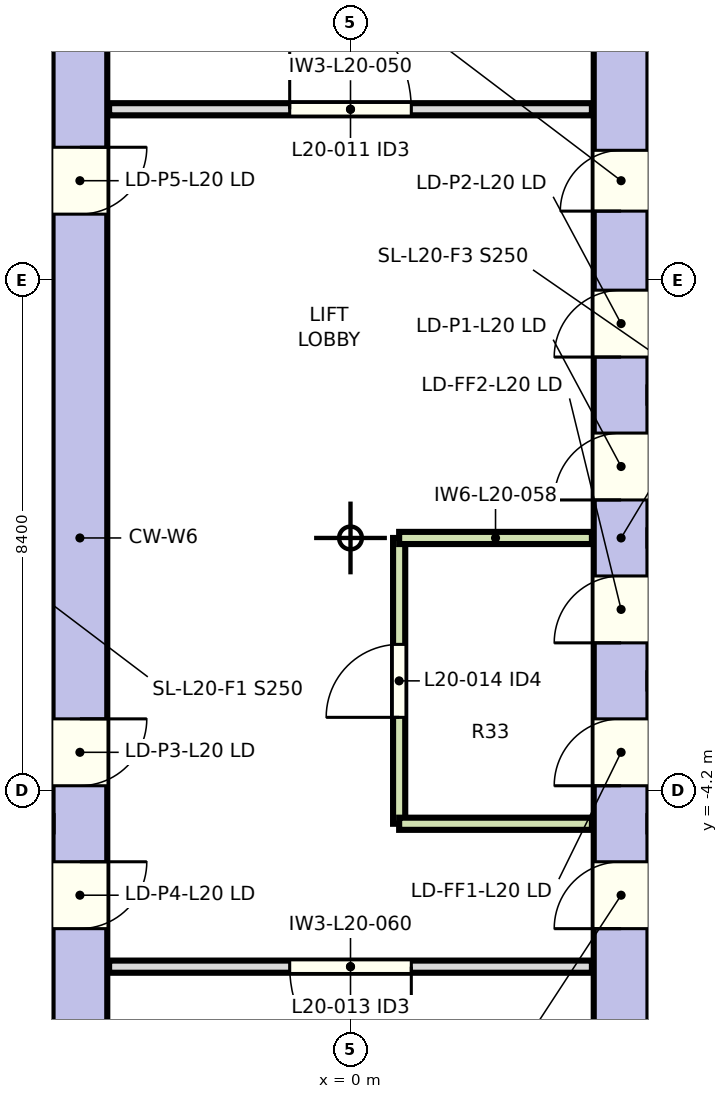
"""IFC4 building model, lengths in metres.
Left out: names, types, materials, properties, quantities, classifications, styles, units other than length and angle.
Written with IfcOpenShell. Run it as: python <this file> out.ifc"""

import sys

from ifc_helpers import new_model, si_unit, direction, frame, frame_2d, origin, place, context, subcontext, project, spatial, rectangle, extrude, element, fill, save


model = new_model("IFC4")
c1 = context("Model", 3, precision=1e-05, world=origin(), true_north=direction((0.0, 1.0)))
c2 = subcontext(c1, "Body", "Model", "MODEL_VIEW")
j1 = project(units=[si_unit("LENGTHUNIT", "METRE"), si_unit("PLANEANGLEUNIT", "RADIAN")], contexts=[c1])
p1 = place(None, origin())
s1 = spatial("IfcSite", under=j1, at=p1, CompositionType="ELEMENT")
p2 = place(p1, origin())
s2 = spatial("IfcBuilding", under=s1, at=p2, CompositionType="ELEMENT")
p3 = place(p2, frame((0.0, 0.0, 104.1)))
s3 = spatial("IfcBuildingStorey", under=s2, at=p3, CompositionType="ELEMENT", Elevation=104.1)
p4 = place(p3, frame((-4.45, 11.633, 0.0), z_axis=(0.0, 0.0, 1.0), x_axis=(0.0, -1.0, 0.0)))
e1 = element("IfcWall", 1, at=p4, inside=s3, PredefinedType="SHEAR", context=c2, shape_type="SweptSolid", body=[
    extrude(rectangle(XDim=23.265, YDim=0.9, at=frame_2d((11.633, 0.0))), origin(), (0.0, 0.0, 1.0), 3.8),
])
p5 = place(p4, frame((14.607, 0.0, 0.0)))
e2 = element("IfcOpeningElement", 2, at=p5, cuts=e1, PredefinedType="OPENING", context=c2, shape_type="SweptSolid", body=[
    extrude(rectangle(XDim=1.1, YDim=2.1, at=frame_2d((0.55, 1.05))), frame((0.0, 0.46, 0.0), z_axis=(0.0, -1.0, 0.0), x_axis=(1.0, 0.0, 0.0)), (0.0, 0.0, 1.0), 0.92),
])
p6 = place(p4, frame((16.958, 0.0, 0.0)))
e3 = element("IfcOpeningElement", 3, at=p6, cuts=e1, PredefinedType="OPENING", context=c2, shape_type="SweptSolid", body=[
    extrude(rectangle(XDim=1.1, YDim=2.1, at=frame_2d((0.55, 1.05))), frame((0.0, 0.46, 0.0), z_axis=(0.0, -1.0, 0.0), x_axis=(1.0, 0.0, 0.0)), (0.0, 0.0, 1.0), 0.92),
])
p7 = place(p4, frame((5.208, 0.0, 0.0)))
e4 = element("IfcOpeningElement", 4, at=p7, cuts=e1, PredefinedType="OPENING", context=c2, shape_type="SweptSolid", body=[
    extrude(rectangle(XDim=1.1, YDim=2.1, at=frame_2d((0.55, 1.05))), frame((0.0, 0.46, 0.0), z_axis=(0.0, -1.0, 0.0), x_axis=(1.0, 0.0, 0.0)), (0.0, 0.0, 1.0), 0.92),
])
p8 = place(p3, frame((4.45, -11.633, 0.0), z_axis=(0.0, 0.0, 1.0), x_axis=(0.0, 1.0, 0.0)))
e5 = element("IfcWall", 5, at=p8, inside=s3, PredefinedType="SHEAR", context=c2, shape_type="SweptSolid", body=[
    extrude(rectangle(XDim=23.265, YDim=0.9, at=frame_2d((11.633, 0.0))), origin(), (0.0, 0.0, 1.0), 3.8),
])
p9 = place(p8, frame((7.558, 0.0, 0.0)))
e6 = element("IfcOpeningElement", 6, at=p9, cuts=e5, PredefinedType="OPENING", context=c2, shape_type="SweptSolid", body=[
    extrude(rectangle(XDim=1.1, YDim=2.1, at=frame_2d((0.55, 1.05))), frame((0.0, 0.46, 0.0), z_axis=(0.0, -1.0, 0.0), x_axis=(1.0, 0.0, 0.0)), (0.0, 0.0, 1.0), 0.92),
])
p10 = place(p8, frame((9.907, 0.0, 0.0)))
e7 = element("IfcOpeningElement", 7, at=p10, cuts=e5, PredefinedType="OPENING", context=c2, shape_type="SweptSolid", body=[
    extrude(rectangle(XDim=1.1, YDim=2.1, at=frame_2d((0.55, 1.05))), frame((0.0, 0.46, 0.0), z_axis=(0.0, -1.0, 0.0), x_axis=(1.0, 0.0, 0.0)), (0.0, 0.0, 1.0), 0.92),
])
p11 = place(p8, frame((12.258, 0.0, 0.0)))
e8 = element("IfcOpeningElement", 8, at=p11, cuts=e5, PredefinedType="OPENING", context=c2, shape_type="SweptSolid", body=[
    extrude(rectangle(XDim=1.1, YDim=2.1, at=frame_2d((0.55, 1.05))), frame((0.0, 0.46, 0.0), z_axis=(0.0, -1.0, 0.0), x_axis=(1.0, 0.0, 0.0)), (0.0, 0.0, 1.0), 0.92),
])
p12 = place(p8, frame((14.607, 0.0, 0.0)))
e9 = element("IfcOpeningElement", 9, at=p12, cuts=e5, PredefinedType="OPENING", context=c2, shape_type="SweptSolid", body=[
    extrude(rectangle(XDim=1.1, YDim=2.1, at=frame_2d((0.55, 1.05))), frame((0.0, 0.46, 0.0), z_axis=(0.0, -1.0, 0.0), x_axis=(1.0, 0.0, 0.0)), (0.0, 0.0, 1.0), 0.92),
])
p13 = place(p8, frame((5.208, 0.0, 0.0)))
e10 = element("IfcOpeningElement", 10, at=p13, cuts=e5, PredefinedType="OPENING", context=c2, shape_type="SweptSolid", body=[
    extrude(rectangle(XDim=1.1, YDim=2.1, at=frame_2d((0.55, 1.05))), frame((0.0, 0.46, 0.0), z_axis=(0.0, -1.0, 0.0), x_axis=(1.0, 0.0, 0.0)), (0.0, 0.0, 1.0), 0.92),
])
p14 = place(p8, frame((17.008, 0.0, 0.0)))
e11 = element("IfcOpeningElement", 11, at=p14, cuts=e5, PredefinedType="OPENING", context=c2, shape_type="SweptSolid", body=[
    extrude(rectangle(XDim=1.0, YDim=2.1, at=frame_2d((0.5, 1.05))), frame((0.0, 0.46, 0.0), z_axis=(0.0, -1.0, 0.0), x_axis=(1.0, 0.0, 0.0)), (0.0, 0.0, 1.0), 0.92),
])
p15 = place(p3, frame((-3.97, 7.05, 0.0), z_axis=(0.0, 0.0, 1.0), x_axis=(1.0, 0.0, 0.0)))
e12 = element("IfcWall", 12, at=p15, inside=s3, PredefinedType="PARTITIONING", context=c2, shape_type="SweptSolid", body=[
    extrude(rectangle(XDim=7.94, YDim=0.2, at=frame_2d((3.97, 0.0))), origin(), (0.0, 0.0, 1.0), 3.55),
])
p16 = place(p15, frame((2.97, 0.0, 0.0)))
e13 = element("IfcOpeningElement", 13, at=p16, cuts=e12, PredefinedType="OPENING", context=c2, shape_type="SweptSolid", body=[
    extrude(rectangle(XDim=2.0, YDim=2.1, at=frame_2d((1.0, 1.05))), frame((0.0, 0.11, 0.0), z_axis=(0.0, -1.0, 0.0), x_axis=(1.0, 0.0, 0.0)), (0.0, 0.0, 1.0), 0.22),
])
p17 = place(p3, frame((0.8, -4.7, 0.0), z_axis=(0.0, 0.0, 1.0), x_axis=(0.0, 1.0, 0.0)))
e14 = element("IfcWall", 14, at=p17, inside=s3, PredefinedType="SOLIDWALL", context=c2, shape_type="SweptSolid", body=[
    extrude(rectangle(XDim=4.7, YDim=0.2, at=frame_2d((2.35, 0.0))), origin(), (0.0, 0.0, 1.0), 3.55),
])
p18 = place(p17, frame((1.75, 0.0, 0.0)))
e15 = element("IfcOpeningElement", 15, at=p18, cuts=e14, PredefinedType="OPENING", context=c2, shape_type="SweptSolid", body=[
    extrude(rectangle(XDim=1.2, YDim=2.1, at=frame_2d((0.6, 1.05))), frame((0.0, 0.11, 0.0), z_axis=(0.0, -1.0, 0.0), x_axis=(1.0, 0.0, 0.0)), (0.0, 0.0, 1.0), 0.22),
])
p19 = place(p3, frame((0.8, 0.0, 0.0), z_axis=(0.0, 0.0, 1.0), x_axis=(1.0, 0.0, 0.0)))
e16 = element("IfcWall", 16, at=p19, inside=s3, PredefinedType="SOLIDWALL", context=c2, shape_type="SweptSolid", body=[
    extrude(rectangle(XDim=3.17, YDim=0.2, at=frame_2d((1.585, 0.0))), origin(), (0.0, 0.0, 1.0), 3.55),
])
p20 = place(p3, frame((3.97, -7.05, 0.0), z_axis=(0.0, 0.0, 1.0), x_axis=(-1.0, 0.0, 0.0)))
e17 = element("IfcWall", 17, at=p20, inside=s3, PredefinedType="PARTITIONING", context=c2, shape_type="SweptSolid", body=[
    extrude(rectangle(XDim=7.94, YDim=0.2, at=frame_2d((3.97, 0.0))), origin(), (0.0, 0.0, 1.0), 3.55),
])
p21 = place(p20, frame((2.97, 0.0, 0.0)))
e18 = element("IfcOpeningElement", 18, at=p21, cuts=e17, PredefinedType="OPENING", context=c2, shape_type="SweptSolid", body=[
    extrude(rectangle(XDim=2.0, YDim=2.1, at=frame_2d((1.0, 1.05))), frame((0.0, 0.11, 0.0), z_axis=(0.0, -1.0, 0.0), x_axis=(1.0, 0.0, 0.0)), (0.0, 0.0, 1.0), 0.22),
])
p22 = place(p3, frame((3.97, -4.7, 0.0), z_axis=(0.0, 0.0, 1.0), x_axis=(-1.0, 0.0, 0.0)))
e19 = element("IfcWall", 19, at=p22, inside=s3, PredefinedType="SOLIDWALL", context=c2, shape_type="SweptSolid", body=[
    extrude(rectangle(XDim=3.17, YDim=0.2, at=frame_2d((1.585, 0.0))), origin(), (0.0, 0.0, 1.0), 3.55),
])
p23 = place(p3, frame((4.599, 15.862, 0.0), z_axis=(0.0, 0.0, 1.0), x_axis=(-0.94551912499, -0.325566558907, 0.0)))
e20 = element("IfcWall", 20, at=p23, inside=s3, PredefinedType="PARTITIONING", context=c2, shape_type="SweptSolid", body=[
    extrude(rectangle(XDim=26.293, YDim=0.2, at=frame_2d((13.146, 0.0))), origin(), (0.0, 0.0, 1.0), 3.55),
])
p24 = place(p23, frame((10.81, 0.0, 0.0)))
e21 = element("IfcOpeningElement", 21, at=p24, cuts=e20, PredefinedType="OPENING", context=c2, shape_type="SweptSolid", body=[
    extrude(rectangle(XDim=0.9, YDim=2.1, at=frame_2d((0.45, 1.05))), frame((0.0, 0.11, 0.0), z_axis=(0.0, -1.0, 0.0), x_axis=(1.0, 0.0, 0.0)), (0.0, 0.0, 1.0), 0.22),
])
p25 = place(p23, frame((5.979, 0.0, 0.0)))
e22 = element("IfcOpeningElement", 22, at=p25, cuts=e20, PredefinedType="OPENING", context=c2, shape_type="SweptSolid", body=[
    extrude(rectangle(XDim=2.0, YDim=2.1, at=frame_2d((1.0, 1.05))), frame((0.0, 0.11, 0.0), z_axis=(0.0, -1.0, 0.0), x_axis=(1.0, 0.0, 0.0)), (0.0, 0.0, 1.0), 0.22),
])
for number, where, z_axis, x_axis in (
    (23, (4.9, -4.7, 0.0), (0.0, 0.0, 1.0), (1.0, 0.0, 0.0)),
    (24, (4.9, 0.0, 0.0), (0.0, 0.0, 1.0), (1.0, 0.0, 0.0)),
):
    element("IfcWall", number, at=place(p3, frame(where, z_axis=z_axis, x_axis=x_axis)), inside=s3, PredefinedType="SOLIDWALL", context=c2, shape_type="SweptSolid", body=[
        extrude(rectangle(XDim=2.675, YDim=0.25, at=frame_2d((1.337, 0.0))), origin(), (0.0, 0.0, 1.0), 3.55),
    ])
p26 = place(p16, origin())
e25 = element("IfcDoor", 25, at=p26, inside=s3, OperationType="NOTDEFINED", PredefinedType="DOOR", context=c2, shape_type="SweptSolid", body=[
    extrude(rectangle(XDim=2.0, YDim=2.1, at=frame_2d((1.0, 1.05))), frame((0.0, 0.025, 0.0), z_axis=(0.0, -1.0, 0.0), x_axis=(1.0, 0.0, 0.0)), (0.0, 0.0, 1.0), 0.05),
])
fill(e13, e25)
p27 = place(p21, origin())
e26 = element("IfcDoor", 26, at=p27, inside=s3, OperationType="NOTDEFINED", PredefinedType="DOOR", context=c2, shape_type="SweptSolid", body=[
    extrude(rectangle(XDim=2.0, YDim=2.1, at=frame_2d((1.0, 1.05))), frame((0.0, 0.025, 0.0), z_axis=(0.0, -1.0, 0.0), x_axis=(1.0, 0.0, 0.0)), (0.0, 0.0, 1.0), 0.05),
])
fill(e18, e26)
p28 = place(p18, origin())
e27 = element("IfcDoor", 27, at=p28, inside=s3, OperationType="NOTDEFINED", PredefinedType="DOOR", context=c2, shape_type="SweptSolid", body=[
    extrude(rectangle(XDim=1.2, YDim=2.1, at=frame_2d((0.6, 1.05))), frame((0.0, 0.025, 0.0), z_axis=(0.0, -1.0, 0.0), x_axis=(1.0, 0.0, 0.0)), (0.0, 0.0, 1.0), 0.05),
])
fill(e15, e27)
p29 = place(p9, origin())
e28 = element("IfcDoor", 28, at=p29, inside=s3, OperationType="SLIDING_TO_LEFT", PredefinedType="DOOR", context=c2, shape_type="SweptSolid", body=[
    extrude(rectangle(XDim=1.1, YDim=2.1, at=frame_2d((0.55, 1.05))), frame((0.0, 0.025, 0.0), z_axis=(0.0, -1.0, 0.0), x_axis=(1.0, 0.0, 0.0)), (0.0, 0.0, 1.0), 0.05),
])
fill(e6, e28)
p30 = place(p10, origin())
e29 = element("IfcDoor", 29, at=p30, inside=s3, OperationType="SLIDING_TO_LEFT", PredefinedType="DOOR", context=c2, shape_type="SweptSolid", body=[
    extrude(rectangle(XDim=1.1, YDim=2.1, at=frame_2d((0.55, 1.05))), frame((0.0, 0.025, 0.0), z_axis=(0.0, -1.0, 0.0), x_axis=(1.0, 0.0, 0.0)), (0.0, 0.0, 1.0), 0.05),
])
fill(e7, e29)
p31 = place(p11, origin())
e30 = element("IfcDoor", 30, at=p31, inside=s3, OperationType="SLIDING_TO_LEFT", PredefinedType="DOOR", context=c2, shape_type="SweptSolid", body=[
    extrude(rectangle(XDim=1.1, YDim=2.1, at=frame_2d((0.55, 1.05))), frame((0.0, 0.025, 0.0), z_axis=(0.0, -1.0, 0.0), x_axis=(1.0, 0.0, 0.0)), (0.0, 0.0, 1.0), 0.05),
])
fill(e8, e30)
p32 = place(p12, origin())
e31 = element("IfcDoor", 31, at=p32, inside=s3, OperationType="SLIDING_TO_LEFT", PredefinedType="DOOR", context=c2, shape_type="SweptSolid", body=[
    extrude(rectangle(XDim=1.1, YDim=2.1, at=frame_2d((0.55, 1.05))), frame((0.0, 0.025, 0.0), z_axis=(0.0, -1.0, 0.0), x_axis=(1.0, 0.0, 0.0)), (0.0, 0.0, 1.0), 0.05),
])
fill(e9, e31)
p33 = place(p5, origin())
e32 = element("IfcDoor", 32, at=p33, inside=s3, OperationType="SLIDING_TO_LEFT", PredefinedType="DOOR", context=c2, shape_type="SweptSolid", body=[
    extrude(rectangle(XDim=1.1, YDim=2.1, at=frame_2d((0.55, 1.05))), frame((0.0, 0.025, 0.0), z_axis=(0.0, -1.0, 0.0), x_axis=(1.0, 0.0, 0.0)), (0.0, 0.0, 1.0), 0.05),
])
fill(e2, e32)
p34 = place(p6, origin())
e33 = element("IfcDoor", 33, at=p34, inside=s3, OperationType="SLIDING_TO_LEFT", PredefinedType="DOOR", context=c2, shape_type="SweptSolid", body=[
    extrude(rectangle(XDim=1.1, YDim=2.1, at=frame_2d((0.55, 1.05))), frame((0.0, 0.025, 0.0), z_axis=(0.0, -1.0, 0.0), x_axis=(1.0, 0.0, 0.0)), (0.0, 0.0, 1.0), 0.05),
])
fill(e3, e33)
p35 = place(p7, origin())
e34 = element("IfcDoor", 34, at=p35, inside=s3, OperationType="SLIDING_TO_LEFT", PredefinedType="DOOR", context=c2, shape_type="SweptSolid", body=[
    extrude(rectangle(XDim=1.1, YDim=2.1, at=frame_2d((0.55, 1.05))), frame((0.0, 0.025, 0.0), z_axis=(0.0, -1.0, 0.0), x_axis=(1.0, 0.0, 0.0)), (0.0, 0.0, 1.0), 0.05),
])
fill(e4, e34)
p36 = place(p13, origin())
e35 = element("IfcDoor", 35, at=p36, inside=s3, OperationType="SLIDING_TO_LEFT", PredefinedType="DOOR", context=c2, shape_type="SweptSolid", body=[
    extrude(rectangle(XDim=1.1, YDim=2.1, at=frame_2d((0.55, 1.05))), frame((0.0, 0.025, 0.0), z_axis=(0.0, -1.0, 0.0), x_axis=(1.0, 0.0, 0.0)), (0.0, 0.0, 1.0), 0.05),
])
fill(e10, e35)
p37 = place(p14, origin())
e36 = element("IfcDoor", 36, at=p37, inside=s3, OperationType="NOTDEFINED", PredefinedType="DOOR", context=c2, shape_type="SweptSolid", body=[
    extrude(rectangle(XDim=1.0, YDim=2.1, at=frame_2d((0.5, 1.05))), frame((0.0, 0.025, 0.0), z_axis=(0.0, -1.0, 0.0), x_axis=(1.0, 0.0, 0.0)), (0.0, 0.0, 1.0), 0.05),
])
fill(e11, e36)
save(model, sys.argv[1])
